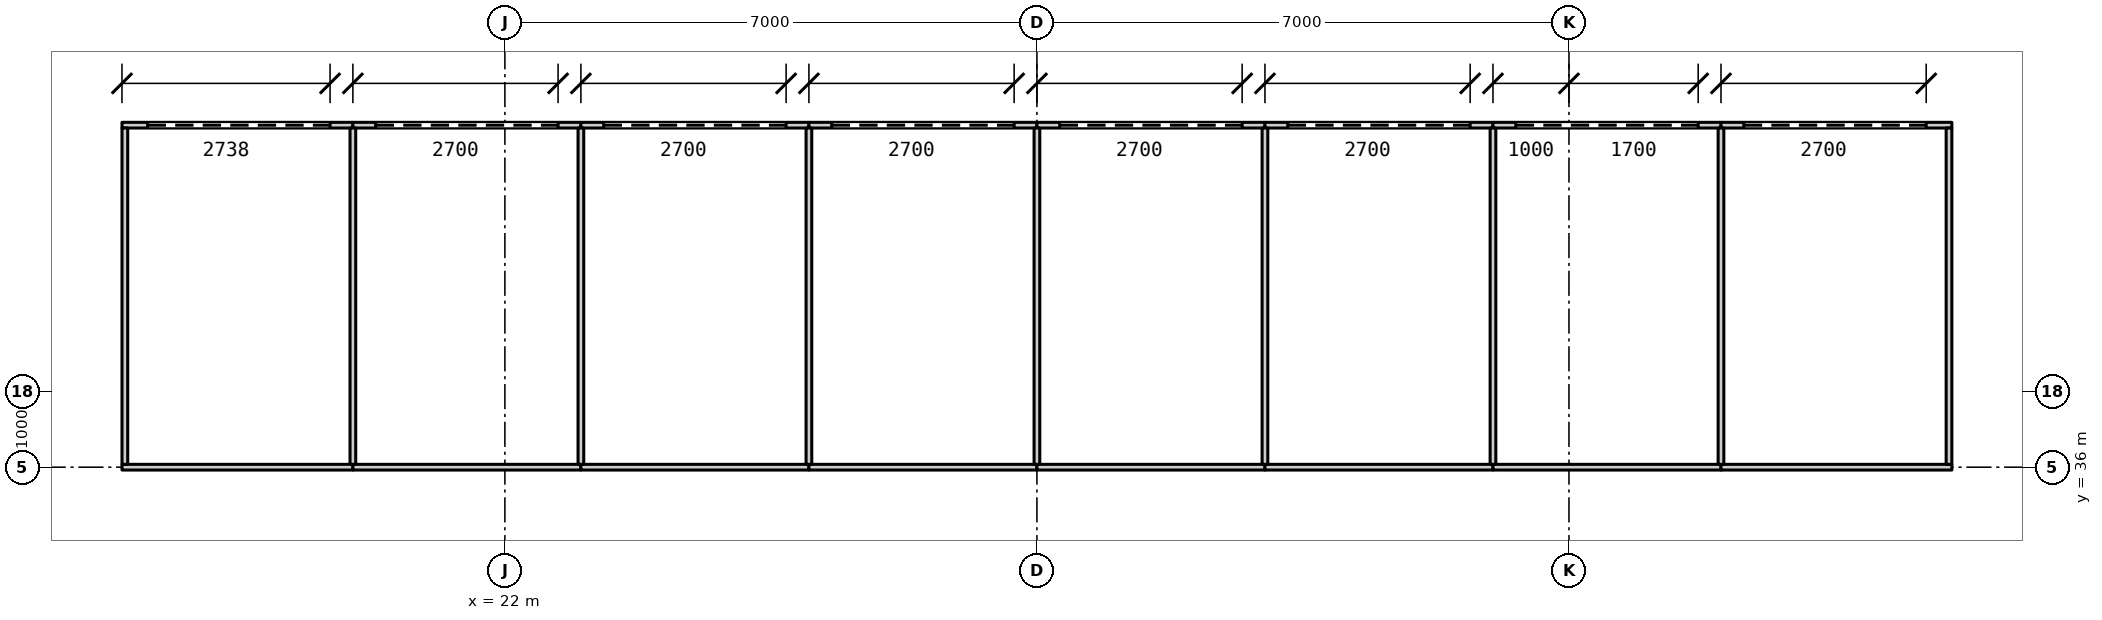
"""IFC4 building model, lengths in metres.
Left out: names, types, materials, properties, quantities, classifications, styles, units other than length and angle.
Written with IfcOpenShell. Run it as: python <this file> out.ifc"""

import sys

from ifc_helpers import new_model, si_unit, direction, frame, frame_2d, origin, place, context, subcontext, project, spatial, rectangle, extrude, element, fill, save


model = new_model("IFC4")
c1 = context("Model", 3, precision=1e-05, world=origin(), true_north=direction((0.0, 1.0)))
c2 = subcontext(c1, "Body", "Model", "MODEL_VIEW")
j1 = project(units=[si_unit("LENGTHUNIT", "METRE"), si_unit("PLANEANGLEUNIT", "RADIAN")], contexts=[c1])
p1 = place(None, origin())
s1 = spatial("IfcSite", under=j1, at=p1, CompositionType="ELEMENT")
p2 = place(p1, origin())
s2 = spatial("IfcBuilding", under=s1, at=p2, CompositionType="ELEMENT")
p3 = place(p2, origin())
s3 = spatial("IfcBuildingStorey", under=s2, at=p3, CompositionType="ELEMENT", Elevation=0.0)
p4 = place(p3, frame((16.962, 36.0, 0.0), z_axis=(0.0, 0.0, 1.0), x_axis=(1.0, 0.0, 0.0)))
e1 = element("IfcWall", 1, at=p4, inside=s3, PredefinedType="PARTITIONING", context=c2, shape_type="SweptSolid", body=[
    extrude(rectangle(XDim=3.038, YDim=0.075, at=frame_2d((1.519, 0.0))), origin(), (0.0, 0.0, 1.0), 3.0),
])
for number, where, z_axis, x_axis in (
    (2, (20.0, 36.0, 0.0), (0.0, 0.0, 1.0), (1.0, 0.0, 0.0)),
    (3, (23.0, 36.0, 0.0), (0.0, 0.0, 1.0), (1.0, 0.0, 0.0)),
    (4, (26.0, 36.0, 0.0), (0.0, 0.0, 1.0), (1.0, 0.0, 0.0)),
    (5, (29.0, 36.0, 0.0), (0.0, 0.0, 1.0), (1.0, 0.0, 0.0)),
    (6, (32.0, 36.0, 0.0), (0.0, 0.0, 1.0), (1.0, 0.0, 0.0)),
    (7, (35.0, 36.0, 0.0), (0.0, 0.0, 1.0), (1.0, 0.0, 0.0)),
):
    element("IfcWall", number, at=place(p3, frame(where, z_axis=z_axis, x_axis=x_axis)), inside=s3, PredefinedType="PARTITIONING", context=c2, shape_type="SweptSolid", body=[
        extrude(rectangle(XDim=3.0, YDim=0.075, at=frame_2d((1.5, 0.0))), origin(), (0.0, 0.0, 1.0), 3.0),
    ])
p5 = place(p3, frame((38.0, 36.0, 0.0), z_axis=(0.0, 0.0, 1.0), x_axis=(1.0, 0.0, 0.0)))
e8 = element("IfcWall", 8, at=p5, inside=s3, PredefinedType="PARTITIONING", context=c2, shape_type="SweptSolid", body=[
    extrude(rectangle(XDim=3.038, YDim=0.075, at=frame_2d((1.519, 0.0))), origin(), (0.0, 0.0, 1.0), 3.0),
])
p6 = place(p3, frame((16.962, 40.5, 0.0), z_axis=(0.0, 0.0, 1.0), x_axis=(1.0, 0.0, 0.0)))
e9 = element("IfcWall", 9, at=p6, inside=s3, PredefinedType="PARTITIONING", context=c2, shape_type="SweptSolid", body=[
    extrude(rectangle(XDim=3.038, YDim=0.075, at=frame_2d((1.519, 0.0))), origin(), (0.0, 0.0, 1.0), 3.0),
])
p7 = place(p6, frame((0.337, 0.0, 0.0)))
e10 = element("IfcOpeningElement", 10, at=p7, cuts=e9, PredefinedType="OPENING", context=c2, shape_type="SweptSolid", body=[
    extrude(rectangle(XDim=2.4, YDim=2.4, at=frame_2d((1.2, 1.2))), frame((0.0, 0.047, 0.0), z_axis=(0.0, -1.0, 0.0), x_axis=(1.0, 0.0, 0.0)), (0.0, 0.0, 1.0), 0.095),
])
p8 = place(p3, frame((20.0, 40.5, 0.0), z_axis=(0.0, 0.0, 1.0), x_axis=(1.0, 0.0, 0.0)))
e11 = element("IfcWall", 11, at=p8, inside=s3, PredefinedType="PARTITIONING", context=c2, shape_type="SweptSolid", body=[
    extrude(rectangle(XDim=3.0, YDim=0.075, at=frame_2d((1.5, 0.0))), origin(), (0.0, 0.0, 1.0), 3.0),
])
p9 = place(p8, frame((0.3, 0.0, 0.0)))
e12 = element("IfcOpeningElement", 12, at=p9, cuts=e11, PredefinedType="OPENING", context=c2, shape_type="SweptSolid", body=[
    extrude(rectangle(XDim=2.4, YDim=2.4, at=frame_2d((1.2, 1.2))), frame((0.0, 0.047, 0.0), z_axis=(0.0, -1.0, 0.0), x_axis=(1.0, 0.0, 0.0)), (0.0, 0.0, 1.0), 0.095),
])
p10 = place(p3, frame((23.0, 40.5, 0.0), z_axis=(0.0, 0.0, 1.0), x_axis=(1.0, 0.0, 0.0)))
e13 = element("IfcWall", 13, at=p10, inside=s3, PredefinedType="PARTITIONING", context=c2, shape_type="SweptSolid", body=[
    extrude(rectangle(XDim=3.0, YDim=0.075, at=frame_2d((1.5, 0.0))), origin(), (0.0, 0.0, 1.0), 3.0),
])
p11 = place(p10, frame((0.3, 0.0, 0.0)))
e14 = element("IfcOpeningElement", 14, at=p11, cuts=e13, PredefinedType="OPENING", context=c2, shape_type="SweptSolid", body=[
    extrude(rectangle(XDim=2.4, YDim=2.4, at=frame_2d((1.2, 1.2))), frame((0.0, 0.047, 0.0), z_axis=(0.0, -1.0, 0.0), x_axis=(1.0, 0.0, 0.0)), (0.0, 0.0, 1.0), 0.095),
])
p12 = place(p3, frame((26.0, 40.5, 0.0), z_axis=(0.0, 0.0, 1.0), x_axis=(1.0, 0.0, 0.0)))
e15 = element("IfcWall", 15, at=p12, inside=s3, PredefinedType="PARTITIONING", context=c2, shape_type="SweptSolid", body=[
    extrude(rectangle(XDim=3.0, YDim=0.075, at=frame_2d((1.5, 0.0))), origin(), (0.0, 0.0, 1.0), 3.0),
])
p13 = place(p12, frame((0.3, 0.0, 0.0)))
e16 = element("IfcOpeningElement", 16, at=p13, cuts=e15, PredefinedType="OPENING", context=c2, shape_type="SweptSolid", body=[
    extrude(rectangle(XDim=2.4, YDim=2.4, at=frame_2d((1.2, 1.2))), frame((0.0, 0.047, 0.0), z_axis=(0.0, -1.0, 0.0), x_axis=(1.0, 0.0, 0.0)), (0.0, 0.0, 1.0), 0.095),
])
p14 = place(p3, frame((29.0, 40.5, 0.0), z_axis=(0.0, 0.0, 1.0), x_axis=(1.0, 0.0, 0.0)))
e17 = element("IfcWall", 17, at=p14, inside=s3, PredefinedType="PARTITIONING", context=c2, shape_type="SweptSolid", body=[
    extrude(rectangle(XDim=3.0, YDim=0.075, at=frame_2d((1.5, 0.0))), origin(), (0.0, 0.0, 1.0), 3.0),
])
p15 = place(p14, frame((0.3, 0.0, 0.0)))
e18 = element("IfcOpeningElement", 18, at=p15, cuts=e17, PredefinedType="OPENING", context=c2, shape_type="SweptSolid", body=[
    extrude(rectangle(XDim=2.4, YDim=2.4, at=frame_2d((1.2, 1.2))), frame((0.0, 0.047, 0.0), z_axis=(0.0, -1.0, 0.0), x_axis=(1.0, 0.0, 0.0)), (0.0, 0.0, 1.0), 0.095),
])
p16 = place(p3, frame((32.0, 40.5, 0.0), z_axis=(0.0, 0.0, 1.0), x_axis=(1.0, 0.0, 0.0)))
e19 = element("IfcWall", 19, at=p16, inside=s3, PredefinedType="PARTITIONING", context=c2, shape_type="SweptSolid", body=[
    extrude(rectangle(XDim=3.0, YDim=0.075, at=frame_2d((1.5, 0.0))), origin(), (0.0, 0.0, 1.0), 3.0),
])
p17 = place(p16, frame((0.3, 0.0, 0.0)))
e20 = element("IfcOpeningElement", 20, at=p17, cuts=e19, PredefinedType="OPENING", context=c2, shape_type="SweptSolid", body=[
    extrude(rectangle(XDim=2.4, YDim=2.4, at=frame_2d((1.2, 1.2))), frame((0.0, 0.047, 0.0), z_axis=(0.0, -1.0, 0.0), x_axis=(1.0, 0.0, 0.0)), (0.0, 0.0, 1.0), 0.095),
])
p18 = place(p3, frame((35.0, 40.5, 0.0), z_axis=(0.0, 0.0, 1.0), x_axis=(1.0, 0.0, 0.0)))
e21 = element("IfcWall", 21, at=p18, inside=s3, PredefinedType="PARTITIONING", context=c2, shape_type="SweptSolid", body=[
    extrude(rectangle(XDim=3.0, YDim=0.075, at=frame_2d((1.5, 0.0))), origin(), (0.0, 0.0, 1.0), 3.0),
])
p19 = place(p18, frame((0.3, 0.0, 0.0)))
e22 = element("IfcOpeningElement", 22, at=p19, cuts=e21, PredefinedType="OPENING", context=c2, shape_type="SweptSolid", body=[
    extrude(rectangle(XDim=2.4, YDim=2.4, at=frame_2d((1.2, 1.2))), frame((0.0, 0.047, 0.0), z_axis=(0.0, -1.0, 0.0), x_axis=(1.0, 0.0, 0.0)), (0.0, 0.0, 1.0), 0.095),
])
p20 = place(p3, frame((38.0, 40.5, 0.0), z_axis=(0.0, 0.0, 1.0), x_axis=(1.0, 0.0, 0.0)))
e23 = element("IfcWall", 23, at=p20, inside=s3, PredefinedType="PARTITIONING", context=c2, shape_type="SweptSolid", body=[
    extrude(rectangle(XDim=3.038, YDim=0.075, at=frame_2d((1.519, 0.0))), origin(), (0.0, 0.0, 1.0), 3.0),
])
p21 = place(p20, frame((0.3, 0.0, 0.0)))
e24 = element("IfcOpeningElement", 24, at=p21, cuts=e23, PredefinedType="OPENING", context=c2, shape_type="SweptSolid", body=[
    extrude(rectangle(XDim=2.4, YDim=2.4, at=frame_2d((1.2, 1.2))), frame((0.0, 0.047, 0.0), z_axis=(0.0, -1.0, 0.0), x_axis=(1.0, 0.0, 0.0)), (0.0, 0.0, 1.0), 0.095),
])
for number, where, z_axis, x_axis in (
    (25, (17.0, 36.038, 0.0), (0.0, 0.0, 1.0), (0.0, 1.0, 0.0)),
    (26, (20.0, 36.038, 0.0), (0.0, 0.0, 1.0), (0.0, 1.0, 0.0)),
    (27, (23.0, 36.038, 0.0), (0.0, 0.0, 1.0), (0.0, 1.0, 0.0)),
    (28, (26.0, 36.038, 0.0), (0.0, 0.0, 1.0), (0.0, 1.0, 0.0)),
    (29, (29.0, 36.038, 0.0), (0.0, 0.0, 1.0), (0.0, 1.0, 0.0)),
    (30, (32.0, 36.038, 0.0), (0.0, 0.0, 1.0), (0.0, 1.0, 0.0)),
    (31, (35.0, 36.038, 0.0), (0.0, 0.0, 1.0), (0.0, 1.0, 0.0)),
    (32, (38.0, 36.038, 0.0), (0.0, 0.0, 1.0), (0.0, 1.0, 0.0)),
    (33, (41.0, 36.038, 0.0), (0.0, 0.0, 1.0), (0.0, 1.0, 0.0)),
):
    element("IfcWall", number, at=place(p3, frame(where, z_axis=z_axis, x_axis=x_axis)), inside=s3, PredefinedType="PARTITIONING", context=c2, shape_type="SweptSolid", body=[
        extrude(rectangle(XDim=4.425, YDim=0.075, at=frame_2d((2.212, 0.0))), origin(), (0.0, 0.0, 1.0), 3.0),
    ])
p22 = place(p7, origin())
e34 = element("IfcDoor", 34, at=p22, inside=s3, OperationType="ROLLINGUP", PredefinedType="DOOR", context=c2, shape_type="SweptSolid", body=[
    extrude(rectangle(XDim=2.4, YDim=2.4, at=frame_2d((1.2, 1.2))), frame((0.0, 0.025, 0.0), z_axis=(0.0, -1.0, 0.0), x_axis=(1.0, 0.0, 0.0)), (0.0, 0.0, 1.0), 0.05),
])
fill(e10, e34)
p23 = place(p9, origin())
e35 = element("IfcDoor", 35, at=p23, inside=s3, OperationType="ROLLINGUP", PredefinedType="DOOR", context=c2, shape_type="SweptSolid", body=[
    extrude(rectangle(XDim=2.4, YDim=2.4, at=frame_2d((1.2, 1.2))), frame((0.0, 0.025, 0.0), z_axis=(0.0, -1.0, 0.0), x_axis=(1.0, 0.0, 0.0)), (0.0, 0.0, 1.0), 0.05),
])
fill(e12, e35)
p24 = place(p11, origin())
e36 = element("IfcDoor", 36, at=p24, inside=s3, OperationType="ROLLINGUP", PredefinedType="DOOR", context=c2, shape_type="SweptSolid", body=[
    extrude(rectangle(XDim=2.4, YDim=2.4, at=frame_2d((1.2, 1.2))), frame((0.0, 0.025, 0.0), z_axis=(0.0, -1.0, 0.0), x_axis=(1.0, 0.0, 0.0)), (0.0, 0.0, 1.0), 0.05),
])
fill(e14, e36)
p25 = place(p13, origin())
e37 = element("IfcDoor", 37, at=p25, inside=s3, OperationType="ROLLINGUP", PredefinedType="DOOR", context=c2, shape_type="SweptSolid", body=[
    extrude(rectangle(XDim=2.4, YDim=2.4, at=frame_2d((1.2, 1.2))), frame((0.0, 0.025, 0.0), z_axis=(0.0, -1.0, 0.0), x_axis=(1.0, 0.0, 0.0)), (0.0, 0.0, 1.0), 0.05),
])
fill(e16, e37)
p26 = place(p15, origin())
e38 = element("IfcDoor", 38, at=p26, inside=s3, OperationType="ROLLINGUP", PredefinedType="DOOR", context=c2, shape_type="SweptSolid", body=[
    extrude(rectangle(XDim=2.4, YDim=2.4, at=frame_2d((1.2, 1.2))), frame((0.0, 0.025, 0.0), z_axis=(0.0, -1.0, 0.0), x_axis=(1.0, 0.0, 0.0)), (0.0, 0.0, 1.0), 0.05),
])
fill(e18, e38)
p27 = place(p17, origin())
e39 = element("IfcDoor", 39, at=p27, inside=s3, OperationType="ROLLINGUP", PredefinedType="DOOR", context=c2, shape_type="SweptSolid", body=[
    extrude(rectangle(XDim=2.4, YDim=2.4, at=frame_2d((1.2, 1.2))), frame((0.0, 0.025, 0.0), z_axis=(0.0, -1.0, 0.0), x_axis=(1.0, 0.0, 0.0)), (0.0, 0.0, 1.0), 0.05),
])
fill(e20, e39)
p28 = place(p19, origin())
e40 = element("IfcDoor", 40, at=p28, inside=s3, OperationType="ROLLINGUP", PredefinedType="DOOR", context=c2, shape_type="SweptSolid", body=[
    extrude(rectangle(XDim=2.4, YDim=2.4, at=frame_2d((1.2, 1.2))), frame((0.0, 0.025, 0.0), z_axis=(0.0, -1.0, 0.0), x_axis=(1.0, 0.0, 0.0)), (0.0, 0.0, 1.0), 0.05),
])
fill(e22, e40)
p29 = place(p21, origin())
e41 = element("IfcDoor", 41, at=p29, inside=s3, OperationType="ROLLINGUP", PredefinedType="DOOR", context=c2, shape_type="SweptSolid", body=[
    extrude(rectangle(XDim=2.4, YDim=2.4, at=frame_2d((1.2, 1.2))), frame((0.0, 0.025, 0.0), z_axis=(0.0, -1.0, 0.0), x_axis=(1.0, 0.0, 0.0)), (0.0, 0.0, 1.0), 0.05),
])
fill(e24, e41)
save(model, sys.argv[1])
